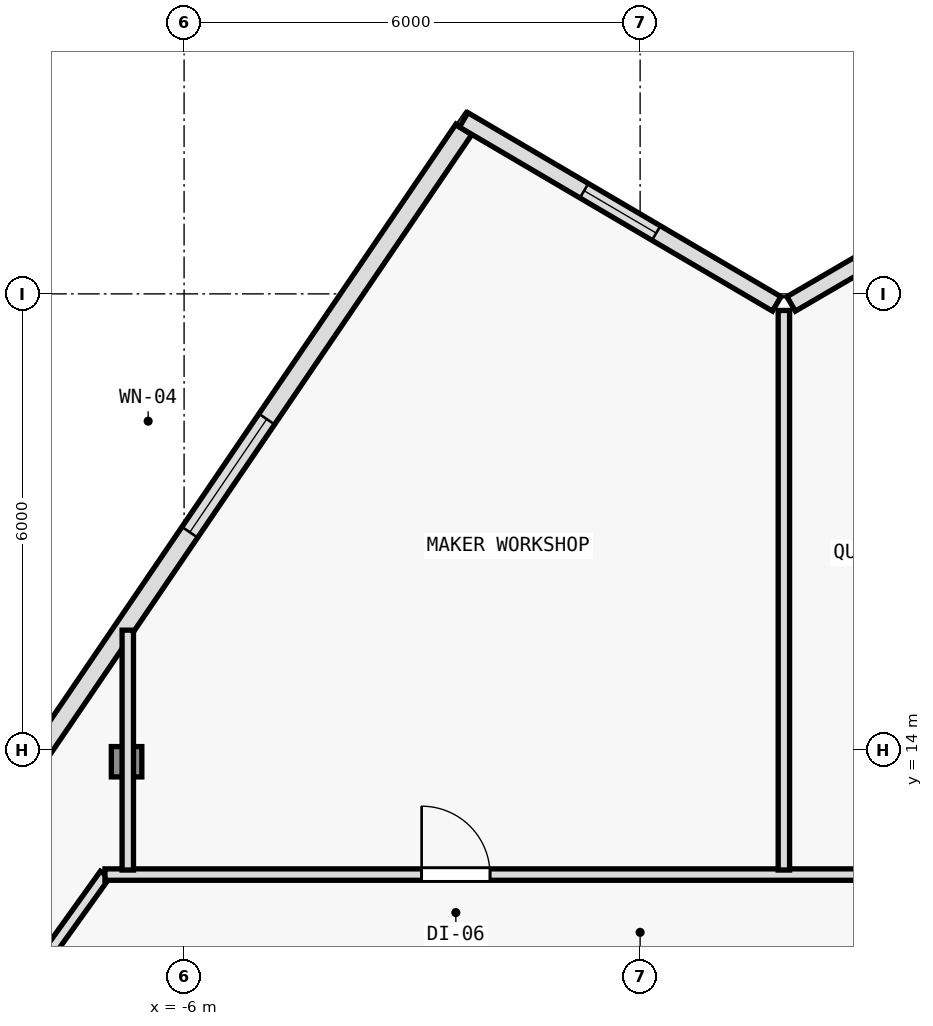
"""IFC4 building model, lengths in metres.
Left out: names, types, materials, properties, quantities, classifications, styles, units other than length and angle.
Written with IfcOpenShell. Run it as: python <this file> out.ifc"""

import sys

from ifc_helpers import new_model, si_unit, direction, frame, frame_2d, origin, origin_2d, place, context, subcontext, project, spatial, rectangle, i_section, extrude, element, fill, save


model = new_model("IFC4")
c1 = context("Model", 3, precision=1e-05, world=origin(), true_north=direction((0.0, 1.0)))
c2 = subcontext(c1, "Body", "Model", "MODEL_VIEW")
j1 = project(units=[si_unit("LENGTHUNIT", "METRE"), si_unit("PLANEANGLEUNIT", "RADIAN")], contexts=[c1])
p1 = place(None, origin())
s1 = spatial("IfcSite", under=j1, at=p1, CompositionType="ELEMENT")
p2 = place(p1, origin())
s2 = spatial("IfcBuilding", under=s1, at=p2, CompositionType="ELEMENT")
p3 = place(p2, frame((0.0, 0.0, 171.0)))
s3 = spatial("IfcBuildingStorey", under=s2, at=p3, CompositionType="ELEMENT", Elevation=171.0)
p4 = place(p3, frame((-6.757, 13.844, 0.006), z_axis=(0.00877514453, -0.002516901919, 0.999958330153), x_axis=(0.275705143097, 0.961242255662, 0.0)))
e1 = element("IfcColumn", 1, at=p4, inside=s3, PredefinedType="COLUMN", context=c2, shape_type="SweptSolid", body=[
    extrude(i_section(OverallWidth=0.401, OverallDepth=0.399, WebThickness=0.016, FlangeThickness=0.025, FilletRadius=0.015, at=origin_2d()), origin(), (0.0, 0.0, 1.0), 3.589),
])
p5 = place(p3, frame((-8.517, 13.053, 0.0), z_axis=(0.0, 0.0, 1.0), x_axis=(0.562463961516, 0.826821801838, 0.0)))
e2 = element("IfcWall", 2, at=p5, inside=s3, PredefinedType="SOLIDWALL", context=c2, shape_type="SweptSolid", body=[
    extrude(rectangle(XDim=11.018, YDim=0.25, at=frame_2d((5.509, 0.0))), origin(), (0.0, 0.0, 1.0), 3.35),
])
p6 = place(p5, frame((4.609, 0.0, 0.62)))
e3 = element("IfcOpeningElement", 3, at=p6, cuts=e2, PredefinedType="OPENING", context=c2, shape_type="SweptSolid", body=[
    extrude(rectangle(XDim=1.8, YDim=2.1, at=frame_2d((0.9, 1.05))), frame((0.0, 0.135, 0.0), z_axis=(0.0, -1.0, 0.0), x_axis=(1.0, 0.0, 0.0)), (0.0, 0.0, 1.0), 0.27),
])
p7 = place(p3, frame((1.987, 19.868, 0.0), z_axis=(0.0, 0.0, 1.0), x_axis=(0.863979520686, 0.503526948469, 0.0)))
e4 = element("IfcWall", 4, at=p7, inside=s3, PredefinedType="SOLIDWALL", context=c2, shape_type="SweptSolid", body=[
    extrude(rectangle(XDim=4.324, YDim=0.22, at=frame_2d((2.162, 0.0))), origin(), (0.0, 0.0, 1.0), 3.35),
])
p8 = place(p3, frame((-2.322, 22.289, 0.0), z_axis=(0.0, 0.0, 1.0), x_axis=(0.862111523483, -0.506718581738, 0.0)))
e5 = element("IfcWall", 5, at=p8, inside=s3, PredefinedType="SOLIDWALL", context=c2, shape_type="SweptSolid", body=[
    extrude(rectangle(XDim=4.777, YDim=0.22, at=frame_2d((2.389, 0.0))), origin(), (0.0, 0.0, 1.0), 3.35),
])
p9 = place(p8, frame((1.839, 0.0, 0.62)))
e6 = element("IfcOpeningElement", 6, at=p9, cuts=e5, PredefinedType="OPENING", context=c2, shape_type="SweptSolid", body=[
    extrude(rectangle(XDim=1.1, YDim=1.8, at=frame_2d((0.55, 0.9))), frame((0.0, 0.12, 0.0), z_axis=(0.0, -1.0, 0.0), x_axis=(1.0, 0.0, 0.0)), (0.0, 0.0, 1.0), 0.24),
])
p10 = place(p3, frame((-9.86, 8.426, 0.0), z_axis=(0.0, 0.0, 1.0), x_axis=(0.582449511476, 0.812866881218, 0.0)))
e7 = element("IfcWall", 7, at=p10, inside=s3, PredefinedType="PARTITIONING", context=c2, shape_type="SweptSolid", body=[
    extrude(rectangle(XDim=4.84, YDim=0.15, at=frame_2d((2.42, 0.0))), origin(), (0.0, 0.0, 1.0), 2.965),
])
p11 = place(p3, frame((-7.041, 12.36, 0.0), z_axis=(0.0, 0.0, 1.0), x_axis=(1.0, 0.0, 0.0)))
e8 = element("IfcWall", 8, at=p11, inside=s3, PredefinedType="PARTITIONING", context=c2, shape_type="SweptSolid", body=[
    extrude(rectangle(XDim=14.064, YDim=0.15, at=frame_2d((7.032, 0.0))), origin(), (0.0, 0.0, 1.0), 2.965),
])
p12 = place(p11, frame((12.833, 0.0, 0.0)))
e9 = element("IfcOpeningElement", 9, at=p12, cuts=e8, PredefinedType="OPENING", context=c2, shape_type="SweptSolid", body=[
    extrude(rectangle(XDim=0.85, YDim=2.1, at=frame_2d((0.425, 1.05))), frame((0.0, 0.085, 0.0), z_axis=(0.0, -1.0, 0.0), x_axis=(1.0, 0.0, 0.0)), (0.0, 0.0, 1.0), 0.17),
])
p13 = place(p11, frame((10.357, 0.0, 0.0)))
e10 = element("IfcOpeningElement", 10, at=p13, cuts=e8, PredefinedType="OPENING", context=c2, shape_type="SweptSolid", body=[
    extrude(rectangle(XDim=0.9, YDim=2.1, at=frame_2d((0.45, 1.05))), frame((0.0, 0.085, 0.0), z_axis=(0.0, -1.0, 0.0), x_axis=(1.0, 0.0, 0.0)), (0.0, 0.0, 1.0), 0.17),
])
p14 = place(p11, frame((4.167, 0.0, 0.0)))
e11 = element("IfcOpeningElement", 11, at=p14, cuts=e8, PredefinedType="OPENING", context=c2, shape_type="SweptSolid", body=[
    extrude(rectangle(XDim=0.9, YDim=2.1, at=frame_2d((0.45, 1.05))), frame((0.0, 0.085, 0.0), z_axis=(0.0, -1.0, 0.0), x_axis=(1.0, 0.0, 0.0)), (0.0, 0.0, 1.0), 0.17),
])
p15 = place(p3, frame((-6.741, 12.42, 0.0), z_axis=(0.0, 0.0, 1.0), x_axis=(0.0, 1.0, 0.0)))
e12 = element("IfcWall", 12, at=p15, inside=s3, PredefinedType="PARTITIONING", context=c2, shape_type="SweptSolid", body=[
    extrude(rectangle(XDim=3.156, YDim=0.15, at=frame_2d((1.578, 0.0))), origin(), (0.0, 0.0, 1.0), 2.935),
])
p16 = place(p3, frame((1.892, 12.42, 0.0), z_axis=(0.0, 0.0, 1.0), x_axis=(0.0, 1.0, 0.0)))
e13 = element("IfcWall", 13, at=p16, inside=s3, PredefinedType="PARTITIONING", context=c2, shape_type="SweptSolid", body=[
    extrude(rectangle(XDim=7.362, YDim=0.15, at=frame_2d((3.681, 0.0))), origin(), (0.0, 0.0, 1.0), 2.935),
])
p17 = place(p6, origin())
e14 = element("IfcWindow", 14, at=p17, inside=s3, PartitioningType="SINGLE_PANEL", PredefinedType="WINDOW", context=c2, shape_type="SweptSolid", body=[
    extrude(rectangle(XDim=1.8, YDim=2.1, at=frame_2d((0.9, 1.05))), frame((0.0, 0.03, 0.0), z_axis=(0.0, -1.0, 0.0), x_axis=(1.0, 0.0, 0.0)), (0.0, 0.0, 1.0), 0.06),
])
fill(e3, e14)
p18 = place(p9, origin())
e15 = element("IfcWindow", 15, at=p18, inside=s3, PartitioningType="SINGLE_PANEL", PredefinedType="WINDOW", context=c2, shape_type="SweptSolid", body=[
    extrude(rectangle(XDim=1.1, YDim=1.8, at=frame_2d((0.55, 0.9))), frame((0.0, 0.03, 0.0), z_axis=(0.0, -1.0, 0.0), x_axis=(1.0, 0.0, 0.0)), (0.0, 0.0, 1.0), 0.06),
])
fill(e6, e15)
p19 = place(p14, origin())
e16 = element("IfcDoor", 16, at=p19, inside=s3, OperationType="SINGLE_SWING_LEFT", PredefinedType="DOOR", context=c2, shape_type="SweptSolid", body=[
    extrude(rectangle(XDim=0.9, YDim=2.1, at=frame_2d((0.45, 1.05))), frame((0.0, 0.025, 0.0), z_axis=(0.0, -1.0, 0.0), x_axis=(1.0, 0.0, 0.0)), (0.0, 0.0, 1.0), 0.05),
])
fill(e11, e16)
save(model, sys.argv[1])
